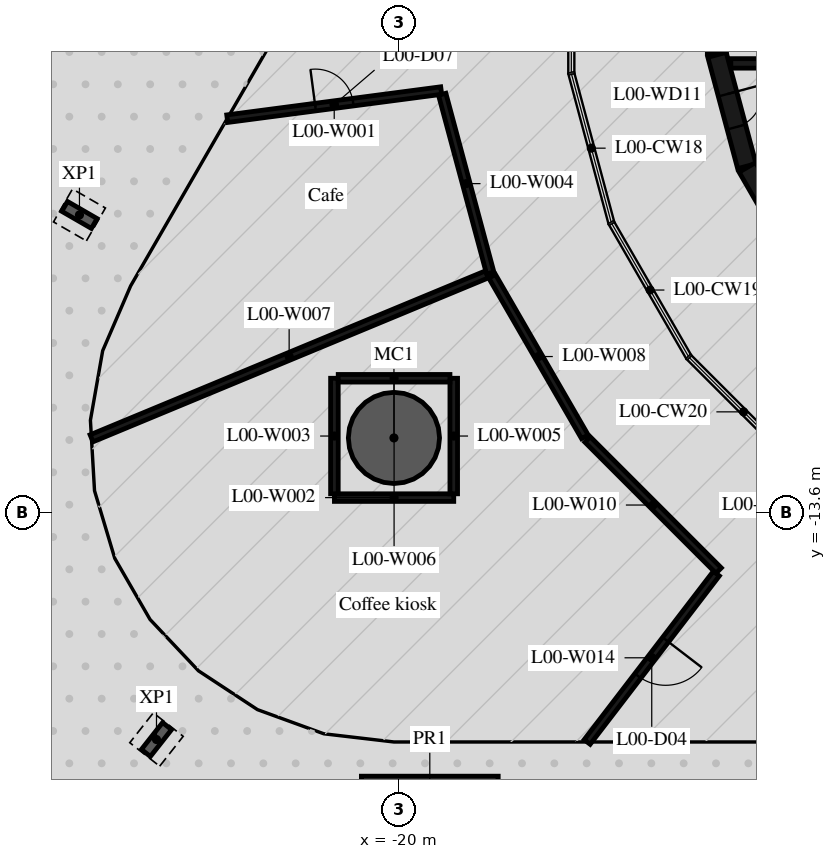
"""IFC4 building model, lengths in metres.
Left out: names, types, materials, properties, quantities, classifications, styles, units other than length and angle.
Written with IfcOpenShell. Run it as: python <this file> out.ifc"""

import sys

from ifc_helpers import new_model, si_unit, direction, frame, frame_2d, origin, origin_2d, place, context, subcontext, project, spatial, rectangle, hollow_circle, i_section, extrude, element, fill, save


model = new_model("IFC4")
c1 = context("Model", 3, precision=1e-05, world=origin(), true_north=direction((0.0, 1.0)))
c2 = subcontext(c1, "Body", "Model", "MODEL_VIEW")
j1 = project(units=[si_unit("LENGTHUNIT", "METRE"), si_unit("PLANEANGLEUNIT", "RADIAN")], contexts=[c1])
p1 = place(None, origin())
s1 = spatial("IfcSite", under=j1, at=p1, CompositionType="ELEMENT")
p2 = place(p1, origin())
s2 = spatial("IfcBuilding", under=s1, at=p2, CompositionType="ELEMENT")
p3 = place(p2, origin())
s3 = spatial("IfcBuildingStorey", under=s2, at=p3, CompositionType="ELEMENT", Elevation=0.0)
p4 = place(p3, frame((-20.144, -11.63, -0.42), z_axis=(0.0, 0.0, 1.0), x_axis=(1.0, 0.0, 0.0)))
e1 = element("IfcColumn", 1, at=p4, inside=s3, PredefinedType="COLUMN", context=c2, shape_type="SweptSolid", body=[
    extrude(hollow_circle(Radius=1.2, WallThickness=0.06, at=origin_2d()), origin(), (0.0, 0.0, 1.0), 9.04),
])
for number, where, z_axis, x_axis in (
    (2, (-28.419, -5.763, -0.42), (0.0, 0.0, 1.0), (0.5, 0.866, 0.0)),
    (3, (-26.392, -19.565, -0.42), (0.0, 0.0, 1.0), (-0.786, 0.619, 0.0)),
):
    element("IfcColumn", number, at=place(p3, frame(where, z_axis=z_axis, x_axis=x_axis)), inside=s3, PredefinedType="COLUMN", context=c2, shape_type="SweptSolid", body=[
        extrude(i_section(OverallWidth=0.3, OverallDepth=0.9, WebThickness=0.019, FlangeThickness=0.035, FilletRadius=0.03, at=origin_2d()), origin(), (0.0, 0.0, 1.0), 9.04),
    ])
p5 = place(p3, frame((-19.2, -21.73, -0.42), z_axis=(0.0, 0.0, 1.0), x_axis=(1.0, 0.0, 0.0)))
e4 = element("IfcColumn", 4, at=p5, inside=s3, PredefinedType="COLUMN", context=c2, shape_type="SweptSolid", body=[
    extrude(rectangle(XDim=3.6, YDim=2.4, at=origin_2d()), origin(), (0.0, 0.0, 1.0), 9.04),
])
p6 = place(p3, frame((-11.647, 1.516, 0.0), z_axis=(0.0, 0.0, 1.0), x_axis=(0.0, -1.0, 0.0)))
e5 = element("IfcWall", 5, at=p6, inside=s3, PredefinedType="SHEAR", context=c2, shape_type="SweptSolid", body=[
    extrude(rectangle(XDim=3.033, YDim=0.5, at=frame_2d((1.516, 0.0))), origin(), (0.0, 0.0, 1.0), 8.62),
])
p7 = place(p6, frame((0.316, 0.0, 0.0)))
e6 = element("IfcOpeningElement", 6, at=p7, cuts=e5, PredefinedType="OPENING", context=c2, shape_type="SweptSolid", body=[
    extrude(rectangle(XDim=2.4, YDim=2.1, at=frame_2d((1.2, 1.05))), frame((0.0, 0.26, 0.0), z_axis=(0.0, -1.0, 0.0), x_axis=(1.0, 0.0, 0.0)), (0.0, 0.0, 1.0), 0.52),
])
p8 = place(p3, frame((-11.643, -1.55, 0.0), z_axis=(0.0, 0.0, 1.0), x_axis=(0.258734743916, -0.965948410781, 0.0)))
e7 = element("IfcWall", 7, at=p8, inside=s3, PredefinedType="SHEAR", context=c2, shape_type="SweptSolid", body=[
    extrude(rectangle(XDim=3.033, YDim=0.5, at=frame_2d((1.516, 0.0))), origin(), (0.0, 0.0, 1.0), 8.62),
])
p9 = place(p8, frame((1.066, 0.0, 0.0)))
e8 = element("IfcOpeningElement", 8, at=p9, cuts=e7, PredefinedType="OPENING", context=c2, shape_type="SweptSolid", body=[
    extrude(rectangle(XDim=0.9, YDim=2.1, at=frame_2d((0.45, 1.05))), frame((0.0, 0.26, 0.0), z_axis=(0.0, -1.0, 0.0), x_axis=(1.0, 0.0, 0.0)), (0.0, 0.0, 1.0), 0.52),
])
p10 = place(p3, frame((-10.845, -4.51, 0.0), z_axis=(0.0, 0.0, 1.0), x_axis=(0.500087131594, -0.865975092491, 0.0)))
e9 = element("IfcWall", 9, at=p10, inside=s3, PredefinedType="SHEAR", context=c2, shape_type="SweptSolid", body=[
    extrude(rectangle(XDim=3.033, YDim=0.5, at=frame_2d((1.516, 0.0))), origin(), (0.0, 0.0, 1.0), 8.62),
])
p11 = place(p3, frame((-11.28, -1.775, 0.0), z_axis=(0.0, 0.0, 1.0), x_axis=(1.0, 0.0, 0.0)))
e10 = element("IfcWall", 10, at=p11, inside=s3, PredefinedType="SHEAR", context=c2, shape_type="SweptSolid", body=[
    extrude(rectangle(XDim=14.38, YDim=0.25, at=frame_2d((7.19, 0.0))), origin(), (0.0, 0.0, 1.0), 8.62),
])
p12 = place(p11, frame((2.03, 0.0, 0.0)))
e11 = element("IfcOpeningElement", 11, at=p12, cuts=e10, PredefinedType="OPENING", context=c2, shape_type="SweptSolid", body=[
    extrude(rectangle(XDim=1.3, YDim=2.1, at=frame_2d((0.65, 1.05))), frame((0.0, 0.135, 0.0), z_axis=(0.0, -1.0, 0.0), x_axis=(1.0, 0.0, 0.0)), (0.0, 0.0, 1.0), 0.27),
])
p13 = place(p11, frame((4.18, 0.0, 0.0)))
e12 = element("IfcOpeningElement", 12, at=p13, cuts=e10, PredefinedType="OPENING", context=c2, shape_type="SweptSolid", body=[
    extrude(rectangle(XDim=1.3, YDim=2.1, at=frame_2d((0.65, 1.05))), frame((0.0, 0.135, 0.0), z_axis=(0.0, -1.0, 0.0), x_axis=(1.0, 0.0, 0.0)), (0.0, 0.0, 1.0), 0.27),
])
p14 = place(p11, frame((7.605, 0.0, 0.0)))
e13 = element("IfcOpeningElement", 13, at=p14, cuts=e10, PredefinedType="OPENING", context=c2, shape_type="SweptSolid", body=[
    extrude(rectangle(XDim=0.9, YDim=2.1, at=frame_2d((0.45, 1.05))), frame((0.0, 0.135, 0.0), z_axis=(0.0, -1.0, 0.0), x_axis=(1.0, 0.0, 0.0)), (0.0, 0.0, 1.0), 0.27),
])
p15 = place(p11, frame((10.83, 0.0, 0.0)))
e14 = element("IfcOpeningElement", 14, at=p15, cuts=e10, PredefinedType="OPENING", context=c2, shape_type="SweptSolid", body=[
    extrude(rectangle(XDim=0.9, YDim=2.1, at=frame_2d((0.45, 1.05))), frame((0.0, 0.135, 0.0), z_axis=(0.0, -1.0, 0.0), x_axis=(1.0, 0.0, 0.0)), (0.0, 0.0, 1.0), 0.27),
])
p16 = place(p11, frame((12.98, 0.0, 0.0)))
e15 = element("IfcOpeningElement", 15, at=p16, cuts=e10, PredefinedType="OPENING", context=c2, shape_type="SweptSolid", body=[
    extrude(rectangle(XDim=0.9, YDim=2.1, at=frame_2d((0.45, 1.05))), frame((0.0, 0.135, 0.0), z_axis=(0.0, -1.0, 0.0), x_axis=(1.0, 0.0, 0.0)), (0.0, 0.0, 1.0), 0.27),
])
p17 = place(p3, frame((-24.53, -3.23, 0.0), z_axis=(0.0, 0.0, 1.0), x_axis=(0.991472870142, 0.130313267829, 0.0)))
e16 = element("IfcWall", 16, at=p17, inside=s3, PredefinedType="PARTITIONING", context=c2, shape_type="SweptSolid", body=[
    extrude(rectangle(XDim=5.678, YDim=0.2, at=frame_2d((2.839, 0.0))), origin(), (0.0, 0.0, 1.0), 8.62),
])
p18 = place(p17, frame((2.339, 0.0, 0.0)))
e17 = element("IfcOpeningElement", 17, at=p18, cuts=e16, PredefinedType="OPENING", context=c2, shape_type="SweptSolid", body=[
    extrude(rectangle(XDim=1.0, YDim=2.1, at=frame_2d((0.5, 1.05))), frame((0.0, 0.11, 0.0), z_axis=(0.0, -1.0, 0.0), x_axis=(1.0, 0.0, 0.0)), (0.0, 0.0, 1.0), 0.22),
])
p19 = place(p3, frame((-21.71, -13.2, 0.0), z_axis=(0.0, 0.0, 1.0), x_axis=(1.0, 0.0, 0.0)))
e18 = element("IfcWall", 18, at=p19, inside=s3, PredefinedType="PARTITIONING", context=c2, shape_type="SweptSolid", body=[
    extrude(rectangle(XDim=3.14, YDim=0.2, at=frame_2d((1.57, 0.0))), origin(), (0.0, 0.0, 1.0), 8.62),
])
p20 = place(p3, frame((-21.71, -10.06, 0.0), z_axis=(0.0, 0.0, 1.0), x_axis=(0.0, -1.0, 0.0)))
e19 = element("IfcWall", 19, at=p20, inside=s3, PredefinedType="PARTITIONING", context=c2, shape_type="SweptSolid", body=[
    extrude(rectangle(XDim=3.04, YDim=0.2, at=frame_2d((1.52, 0.0))), origin(), (0.0, 0.0, 1.0), 8.62),
])
p21 = place(p3, frame((-18.874, -2.587, 0.0), z_axis=(0.0, 0.0, 1.0), x_axis=(0.259518617631, -0.965738104821, 0.0)))
e20 = element("IfcWall", 20, at=p21, inside=s3, PredefinedType="PARTITIONING", context=c2, shape_type="SweptSolid", body=[
    extrude(rectangle(XDim=4.87, YDim=0.2, at=frame_2d((2.435, 0.0))), origin(), (0.0, 0.0, 1.0), 8.62),
])
p22 = place(p3, frame((-18.57, -13.1, 0.0), z_axis=(0.0, 0.0, 1.0), x_axis=(0.0, 1.0, 0.0)))
e21 = element("IfcWall", 21, at=p22, inside=s3, PredefinedType="PARTITIONING", context=c2, shape_type="SweptSolid", body=[
    extrude(rectangle(XDim=3.04, YDim=0.2, at=frame_2d((1.52, 0.0))), origin(), (0.0, 0.0, 1.0), 8.62),
])
p23 = place(p3, frame((-18.67, -10.06, 0.0), z_axis=(0.0, 0.0, 1.0), x_axis=(-1.0, 0.0, 0.0)))
e22 = element("IfcWall", 22, at=p23, inside=s3, PredefinedType="PARTITIONING", context=c2, shape_type="SweptSolid", body=[
    extrude(rectangle(XDim=2.94, YDim=0.2, at=frame_2d((1.47, 0.0))), origin(), (0.0, 0.0, 1.0), 8.62),
])
p24 = place(p3, frame((-17.702, -7.328, 0.0), z_axis=(0.0, 0.0, 1.0), x_axis=(-0.923733316427, -0.383036238655, 0.0)))
e23 = element("IfcWall", 23, at=p24, inside=s3, PredefinedType="PARTITIONING", context=c2, shape_type="SweptSolid", body=[
    extrude(rectangle(XDim=11.256, YDim=0.2, at=frame_2d((5.628, 0.0))), origin(), (0.0, 0.0, 1.0), 8.62),
])
p25 = place(p3, frame((-17.56, -7.377, 0.0), z_axis=(0.0, 0.0, 1.0), x_axis=(0.500240904659, -0.865886272732, 0.0)))
e24 = element("IfcWall", 24, at=p25, inside=s3, PredefinedType="PARTITIONING", context=c2, shape_type="SweptSolid", body=[
    extrude(rectangle(XDim=4.877, YDim=0.2, at=frame_2d((2.439, 0.0))), origin(), (0.0, 0.0, 1.0), 8.62),
])
p26 = place(p3, frame((-15.049, -11.671, 0.0), z_axis=(0.0, 0.0, 1.0), x_axis=(0.707081756616, -0.707131804872, 0.0)))
e25 = element("IfcWall", 25, at=p26, inside=s3, PredefinedType="PARTITIONING", context=c2, shape_type="SweptSolid", body=[
    extrude(rectangle(XDim=4.878, YDim=0.2, at=frame_2d((2.439, 0.0))), origin(), (0.0, 0.0, 1.0), 8.62),
])
p27 = place(p3, frame((-11.661, -15.199, 0.0), z_axis=(0.0, 0.0, 1.0), x_axis=(-0.608694005511, -0.793405071609, 0.0)))
e26 = element("IfcWall", 26, at=p27, inside=s3, PredefinedType="PARTITIONING", context=c2, shape_type="SweptSolid", body=[
    extrude(rectangle(XDim=5.584, YDim=0.2, at=frame_2d((2.792, 0.0))), origin(), (0.0, 0.0, 1.0), 8.62),
])
p28 = place(p27, frame((2.192, 0.0, 0.0)))
e27 = element("IfcOpeningElement", 27, at=p28, cuts=e26, PredefinedType="OPENING", context=c2, shape_type="SweptSolid", body=[
    extrude(rectangle(XDim=1.2, YDim=2.1, at=frame_2d((0.6, 1.05))), frame((0.0, 0.11, 0.0), z_axis=(0.0, -1.0, 0.0), x_axis=(1.0, 0.0, 0.0)), (0.0, 0.0, 1.0), 0.22),
])
p29 = place(p9, origin())
e28 = element("IfcDoor", 28, at=p29, inside=s3, OperationType="SINGLE_SWING_RIGHT", PredefinedType="DOOR", context=c2, shape_type="SweptSolid", body=[
    extrude(rectangle(XDim=0.9, YDim=2.1, at=frame_2d((0.45, 1.05))), frame((0.0, 0.025, 0.0), z_axis=(0.0, -1.0, 0.0), x_axis=(1.0, 0.0, 0.0)), (0.0, 0.0, 1.0), 0.05),
])
fill(e8, e28)
p30 = place(p28, origin())
e29 = element("IfcDoor", 29, at=p30, inside=s3, OperationType="SINGLE_SWING_LEFT", PredefinedType="DOOR", context=c2, shape_type="SweptSolid", body=[
    extrude(rectangle(XDim=1.2, YDim=2.1, at=frame_2d((0.6, 1.05))), frame((0.0, 0.025, 0.0), z_axis=(0.0, -1.0, 0.0), x_axis=(1.0, 0.0, 0.0)), (0.0, 0.0, 1.0), 0.05),
])
fill(e27, e29)
p31 = place(p18, origin())
e30 = element("IfcDoor", 30, at=p31, inside=s3, OperationType="SINGLE_SWING_LEFT", PredefinedType="DOOR", context=c2, shape_type="SweptSolid", body=[
    extrude(rectangle(XDim=1.0, YDim=2.1, at=frame_2d((0.5, 1.05))), frame((0.0, 0.025, 0.0), z_axis=(0.0, -1.0, 0.0), x_axis=(1.0, 0.0, 0.0)), (0.0, 0.0, 1.0), 0.05),
])
fill(e17, e30)
save(model, sys.argv[1])
